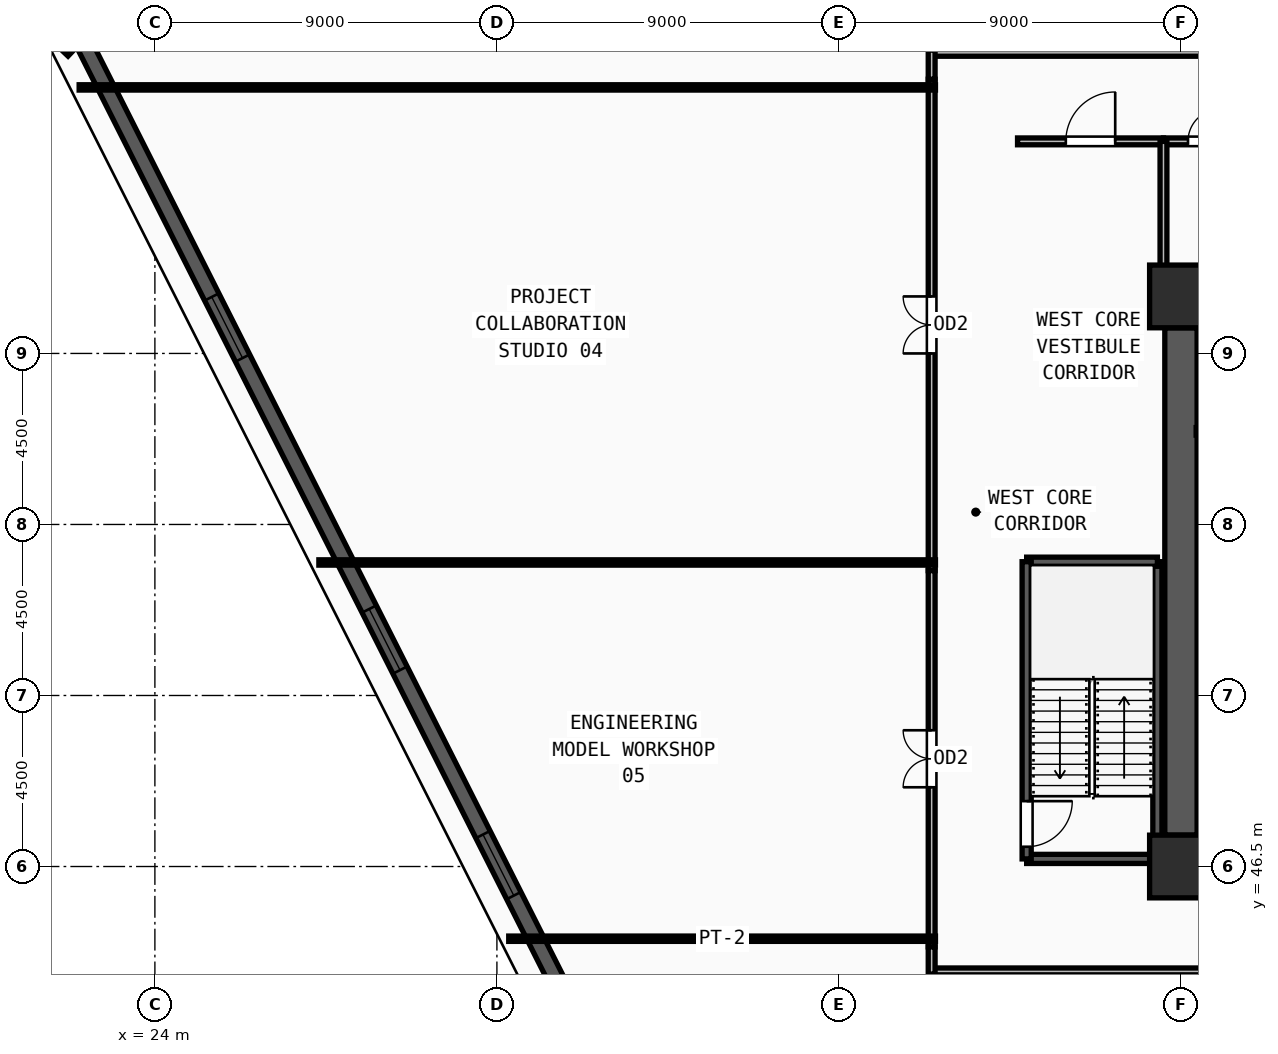
"""IFC4 building model, lengths in metres.
Left out: names, types, materials, properties, quantities, classifications, styles, units other than length and angle.
Written with IfcOpenShell. Run it as: python <this file> out.ifc"""

import sys

from ifc_helpers import new_model, si_unit, direction, frame, frame_2d, origin, origin_2d, place, context, subcontext, project, spatial, rectangle, extrude, source, transform, mapped, element, fill, save


model = new_model("IFC4")
c1 = context("Model", 3, precision=1e-05, world=origin(), true_north=direction((0.0, 1.0)))
c2 = subcontext(c1, "Body", "Model", "MODEL_VIEW")
j1 = project(units=[si_unit("LENGTHUNIT", "METRE"), si_unit("PLANEANGLEUNIT", "RADIAN")], contexts=[c1])
p1 = place(None, origin())
s1 = spatial("IfcSite", under=j1, at=p1, CompositionType="ELEMENT")
p2 = place(p1, origin())
s2 = spatial("IfcBuilding", under=s1, at=p2, CompositionType="ELEMENT")
p3 = place(p2, frame((0.0, 0.0, 63.0)))
s3 = spatial("IfcBuildingStorey", under=s2, at=p3, CompositionType="ELEMENT", Elevation=63.0)
m1 = source(origin(), c2, "Body", "SweptSolid", [
    extrude(rectangle(XDim=1.65, YDim=1.65, at=origin_2d()), origin(), (0.0, 0.0, 1.0), 3.75),
])
for number, where, z_axis, x_axis in (
    (1, (51.0, 46.5, 0.0), (0.0, 0.0, 1.0), (1.0, 0.0, 0.0)),
    (2, (51.0, 61.5, 0.0), (0.0, 0.0, 1.0), (1.0, 0.0, 0.0)),
):
    element("IfcColumn", number, at=place(p3, frame(where, z_axis=z_axis, x_axis=x_axis)), inside=s3, PredefinedType="COLUMN", context=c2, shape_type="MappedRepresentation", body=[
        mapped(m1, transform((0.0, 0.0, 0.0), x_axis=(1.0, 0.0, 0.0), y_axis=(0.0, 1.0, 0.0), z_axis=(0.0, 0.0, 1.0), scale=1.0)),
    ])
m2 = source(origin(), c2, "Body", "SweptSolid", [
    extrude(rectangle(XDim=1.55, YDim=1.25, at=origin_2d()), origin(), (0.0, 0.0, 1.0), 3.75),
])
p4 = place(p3, frame((21.796, 68.816, 0.0), z_axis=(0.0, 0.0, 1.0), x_axis=(0.689240273721, 0.724532846102, 0.0)))
e3 = element("IfcColumn", 3, at=p4, inside=s3, PredefinedType="COLUMN", context=c2, shape_type="MappedRepresentation", body=[
    mapped(m2, transform((0.0, 0.0, 0.0), x_axis=(1.0, 0.0, 0.0), y_axis=(0.0, 1.0, 0.0), z_axis=(0.0, 0.0, 1.0), scale=1.0)),
])
p5 = place(p3, frame((22.141, 68.133, 0.0), z_axis=(0.0, 0.0, 1.0), x_axis=(0.450521782218, -0.892765436017, 0.0)))
e4 = element("IfcWall", 4, at=p5, inside=s3, PredefinedType="SOLIDWALL", context=c2, shape_type="SweptSolid", body=[
    extrude(rectangle(XDim=33.385, YDim=0.42, at=frame_2d((16.693, 0.0))), origin(), (0.0, 0.0, 1.0), 3.57),
])
m3 = source(origin(), c2, "Body", "SweptSolid", [
    extrude(rectangle(XDim=1.8, YDim=1.95, at=frame_2d((0.9, 0.975))), frame((0.0, 0.22, 0.0), z_axis=(0.0, -1.0, 0.0), x_axis=(1.0, 0.0, 0.0)), (0.0, 0.0, 1.0), 0.44),
])
p6 = place(p5, frame((7.446, 0.0, 0.55)))
e5 = element("IfcOpeningElement", 5, at=p6, cuts=e4, PredefinedType="OPENING", context=c2, shape_type="MappedRepresentation", body=[
    mapped(m3, transform((0.0, 0.0, 0.0), x_axis=(1.0, 0.0, 0.0), y_axis=(0.0, 1.0, 0.0), z_axis=(0.0, 0.0, 1.0), scale=1.0)),
])
p7 = place(p5, frame((16.643, 0.0, 0.55)))
e6 = element("IfcOpeningElement", 6, at=p7, cuts=e4, PredefinedType="OPENING", context=c2, shape_type="MappedRepresentation", body=[
    mapped(m3, transform((0.0, 0.0, 0.0), x_axis=(1.0, 0.0, 0.0), y_axis=(0.0, 1.0, 0.0), z_axis=(0.0, 0.0, 1.0), scale=1.0)),
])
p8 = place(p5, frame((23.289, 0.0, 0.55)))
e7 = element("IfcOpeningElement", 7, at=p8, cuts=e4, PredefinedType="OPENING", context=c2, shape_type="MappedRepresentation", body=[
    mapped(m3, transform((0.0, 0.0, 0.0), x_axis=(1.0, 0.0, 0.0), y_axis=(0.0, 1.0, 0.0), z_axis=(0.0, 0.0, 1.0), scale=1.0)),
])
p9 = place(p3, frame((51.0, 47.325, 0.0), z_axis=(0.0, 0.0, 1.0), x_axis=(0.0, 1.0, 0.0)))
e8 = element("IfcWall", 8, at=p9, inside=s3, PredefinedType="SHEAR", context=c2, shape_type="SweptSolid", body=[
    extrude(rectangle(XDim=13.35, YDim=0.85, at=frame_2d((6.675, 0.0))), origin(), (0.0, 0.0, 1.0), 3.57),
])
p10 = place(p3, frame((46.94, 46.7, 0.0), z_axis=(0.0, 0.0, 1.0), x_axis=(1.0, 0.0, 0.0)))
e9 = element("IfcWall", 9, at=p10, inside=s3, PredefinedType="SOLIDWALL", context=c2, shape_type="SweptSolid", body=[
    extrude(rectangle(XDim=3.44, YDim=0.24, at=frame_2d((1.72, 0.0))), origin(), (0.0, 0.0, 1.0), 3.57),
])
p11 = place(p3, frame((50.38, 46.7, 0.0), z_axis=(0.0, 0.0, 1.0), x_axis=(0.0, 1.0, 0.0)))
e10 = element("IfcWall", 10, at=p11, inside=s3, PredefinedType="SOLIDWALL", context=c2, shape_type="SweptSolid", body=[
    extrude(rectangle(XDim=7.82, YDim=0.24, at=frame_2d((3.91, 0.0))), origin(), (0.0, 0.0, 1.0), 3.57),
])
p12 = place(p3, frame((50.38, 54.52, 0.0), z_axis=(0.0, 0.0, 1.0), x_axis=(-1.0, 0.0, 0.0)))
e11 = element("IfcWall", 11, at=p12, inside=s3, PredefinedType="SOLIDWALL", context=c2, shape_type="SweptSolid", body=[
    extrude(rectangle(XDim=3.44, YDim=0.24, at=frame_2d((1.72, 0.0))), origin(), (0.0, 0.0, 1.0), 3.57),
])
p13 = place(p3, frame((46.94, 54.52, 0.0), z_axis=(0.0, 0.0, 1.0), x_axis=(0.0, -1.0, 0.0)))
e12 = element("IfcWall", 12, at=p13, inside=s3, PredefinedType="SOLIDWALL", context=c2, shape_type="SweptSolid", body=[
    extrude(rectangle(XDim=7.82, YDim=0.24, at=frame_2d((3.91, 0.0))), origin(), (0.0, 0.0, 1.0), 3.57),
])
m4 = source(origin(), c2, "Body", "SweptSolid", [
    extrude(rectangle(XDim=1.2, YDim=2.2, at=frame_2d((0.6, 1.1))), frame((0.0, 0.13, 0.0), z_axis=(0.0, -1.0, 0.0), x_axis=(1.0, 0.0, 0.0)), (0.0, 0.0, 1.0), 0.26),
])
p14 = place(p13, frame((6.3, 0.0, 0.0)))
e13 = element("IfcOpeningElement", 13, at=p14, cuts=e12, PredefinedType="OPENING", context=c2, shape_type="MappedRepresentation", body=[
    mapped(m4, transform((0.0, 0.0, 0.0), x_axis=(1.0, 0.0, 0.0), y_axis=(0.0, 1.0, 0.0), z_axis=(0.0, 0.0, 1.0), scale=1.0)),
])
for number, where, z_axis, x_axis in (
    (14, (51.4, 57.95, 0.0), (0.0, 0.0, 1.0), (1.0, 0.0, 0.0)),
    (15, (53.8, 60.88, 0.0), (0.0, 0.0, 1.0), (-1.0, 0.0, 0.0)),
):
    element("IfcWall", number, at=place(p3, frame(where, z_axis=z_axis, x_axis=x_axis)), inside=s3, PredefinedType="SOLIDWALL", context=c2, shape_type="SweptSolid", body=[
        extrude(rectangle(XDim=2.4, YDim=0.2, at=frame_2d((1.2, 0.0))), origin(), (0.0, 0.0, 1.0), 3.57),
    ])
p15 = place(p3, frame((50.54, 65.58, 0.0), z_axis=(0.0, 0.0, 1.0), x_axis=(1.0, 0.0, 0.0)))
e16 = element("IfcWall", 16, at=p15, inside=s3, PredefinedType="PARTITIONING", context=c2, shape_type="SweptSolid", body=[
    extrude(rectangle(XDim=2.14, YDim=0.18, at=frame_2d((1.07, 0.0))), origin(), (0.0, 0.0, 1.0), 3.57),
])
m5 = source(origin(), c2, "Body", "SweptSolid", [
    extrude(rectangle(XDim=0.85, YDim=2.1, at=frame_2d((0.425, 1.05))), frame((0.0, 0.1, 0.0), z_axis=(0.0, -1.0, 0.0), x_axis=(1.0, 0.0, 0.0)), (0.0, 0.0, 1.0), 0.2),
])
p16 = place(p15, frame((0.645, 0.0, 0.0)))
e17 = element("IfcOpeningElement", 17, at=p16, cuts=e16, PredefinedType="OPENING", context=c2, shape_type="MappedRepresentation", body=[
    mapped(m5, transform((0.0, 0.0, 0.0), x_axis=(1.0, 0.0, 0.0), y_axis=(0.0, 1.0, 0.0), z_axis=(0.0, 0.0, 1.0), scale=1.0)),
])
p17 = place(p3, frame((46.7, 65.58, 0.0), z_axis=(0.0, 0.0, 1.0), x_axis=(1.0, 0.0, 0.0)))
e18 = element("IfcWall", 18, at=p17, inside=s3, PredefinedType="PARTITIONING", context=c2, shape_type="SweptSolid", body=[
    extrude(rectangle(XDim=3.84, YDim=0.18, at=frame_2d((1.92, 0.0))), origin(), (0.0, 0.0, 1.0), 3.57),
])
m6 = source(origin(), c2, "Body", "SweptSolid", [
    extrude(rectangle(XDim=1.3, YDim=2.2, at=frame_2d((0.65, 1.1))), frame((0.0, 0.1, 0.0), z_axis=(0.0, -1.0, 0.0), x_axis=(1.0, 0.0, 0.0)), (0.0, 0.0, 1.0), 0.2),
])
p18 = place(p17, frame((1.27, 0.0, 0.0)))
e19 = element("IfcOpeningElement", 19, at=p18, cuts=e18, PredefinedType="OPENING", context=c2, shape_type="MappedRepresentation", body=[
    mapped(m6, transform((0.0, 0.0, 0.0), x_axis=(1.0, 0.0, 0.0), y_axis=(0.0, 1.0, 0.0), z_axis=(0.0, 0.0, 1.0), scale=1.0)),
])
p19 = place(p3, frame((44.37, 67.91, 0.0), z_axis=(0.0, 0.0, 1.0), x_axis=(1.0, 0.0, 0.0)))
e20 = element("IfcWall", 20, at=p19, inside=s3, PredefinedType="PARTITIONING", context=c2, shape_type="SweptSolid", body=[
    extrude(rectangle(XDim=19.415, YDim=0.18, at=frame_2d((9.708, 0.0))), origin(), (0.0, 0.0, 1.0), 3.57),
])
m7 = source(origin(), c2, "Body", "SweptSolid", [
    extrude(rectangle(XDim=1.5, YDim=2.2, at=frame_2d((0.75, 1.1))), frame((0.0, 0.1, 0.0), z_axis=(0.0, -1.0, 0.0), x_axis=(1.0, 0.0, 0.0)), (0.0, 0.0, 1.0), 0.2),
])
p20 = place(p19, frame((8.957, 0.0, 0.0)))
e21 = element("IfcOpeningElement", 21, at=p20, cuts=e20, PredefinedType="OPENING", context=c2, shape_type="MappedRepresentation", body=[
    mapped(m7, transform((0.0, 0.0, 0.0), x_axis=(1.0, 0.0, 0.0), y_axis=(0.0, 1.0, 0.0), z_axis=(0.0, 0.0, 1.0), scale=1.0)),
])
p21 = place(p3, frame((44.44, 54.285, 0.0), z_axis=(0.0, 0.0, 1.0), x_axis=(0.0, 1.0, 0.0)))
e22 = element("IfcWall", 22, at=p21, inside=s3, PredefinedType="PARTITIONING", context=c2, shape_type="SweptSolid", body=[
    extrude(rectangle(XDim=12.93, YDim=0.18, at=frame_2d((6.465, 0.0))), origin(), (0.0, 0.0, 1.0), 3.57),
])
p22 = place(p21, frame((5.715, 0.0, 0.0)))
e23 = element("IfcOpeningElement", 23, at=p22, cuts=e22, PredefinedType="OPENING", context=c2, shape_type="MappedRepresentation", body=[
    mapped(m7, transform((0.0, 0.0, 0.0), x_axis=(1.0, 0.0, 0.0), y_axis=(0.0, 1.0, 0.0), z_axis=(0.0, 0.0, 1.0), scale=1.0)),
])
p23 = place(p3, frame((44.44, 44.385, 0.0), z_axis=(0.0, 0.0, 1.0), x_axis=(0.0, 1.0, 0.0)))
e24 = element("IfcWall", 24, at=p23, inside=s3, PredefinedType="PARTITIONING", context=c2, shape_type="SweptSolid", body=[
    extrude(rectangle(XDim=9.9, YDim=0.18, at=frame_2d((4.95, 0.0))), origin(), (0.0, 0.0, 1.0), 3.57),
])
p24 = place(p23, frame((4.2, 0.0, 0.0)))
e25 = element("IfcOpeningElement", 25, at=p24, cuts=e24, PredefinedType="OPENING", context=c2, shape_type="MappedRepresentation", body=[
    mapped(m7, transform((0.0, 0.0, 0.0), x_axis=(1.0, 0.0, 0.0), y_axis=(0.0, 1.0, 0.0), z_axis=(0.0, 0.0, 1.0), scale=1.0)),
])
p25 = place(p3, frame((75.63, 43.74, 0.0), z_axis=(0.0, 0.0, 1.0), x_axis=(-1.0, 0.0, 0.0)))
e26 = element("IfcWall", 26, at=p25, inside=s3, PredefinedType="PARTITIONING", context=c2, shape_type="SweptSolid", body=[
    extrude(rectangle(XDim=31.26, YDim=0.18, at=frame_2d((15.63, 0.0))), origin(), (0.0, 0.0, 1.0), 3.57),
])
p26 = place(p25, frame((9.78, 0.0, 0.0)))
e27 = element("IfcOpeningElement", 27, at=p26, cuts=e26, PredefinedType="OPENING", context=c2, shape_type="MappedRepresentation", body=[
    mapped(m7, transform((0.0, 0.0, 0.0), x_axis=(1.0, 0.0, 0.0), y_axis=(0.0, 1.0, 0.0), z_axis=(0.0, 0.0, 1.0), scale=1.0)),
])
p27 = place(p3, frame((50.54, 61.95, 0.0), z_axis=(0.0, 0.0, 1.0), x_axis=(0.0, 1.0, 0.0)))
e28 = element("IfcWall", 28, at=p27, inside=s3, PredefinedType="PARTITIONING", context=c2, shape_type="SweptSolid", body=[
    extrude(rectangle(XDim=3.63, YDim=0.18, at=frame_2d((1.815, 0.0))), origin(), (0.0, 0.0, 1.0), 3.57),
])
p28 = place(p3, frame((44.44, 67.215, 0.0), z_axis=(0.0, 0.0, 1.0), x_axis=(0.0, 1.0, 0.0)))
e29 = element("IfcWall", 29, at=p28, inside=s3, PredefinedType="PARTITIONING", context=c2, shape_type="SweptSolid", body=[
    extrude(rectangle(XDim=0.765, YDim=0.18, at=frame_2d((0.382, 0.0))), origin(), (0.0, 0.0, 1.0), 3.57),
])
p29 = place(p3, frame((44.44, 43.67, 0.0), z_axis=(0.0, 0.0, 1.0), x_axis=(0.0, 1.0, 0.0)))
e30 = element("IfcWall", 30, at=p29, inside=s3, PredefinedType="PARTITIONING", context=c2, shape_type="SweptSolid", body=[
    extrude(rectangle(XDim=0.715, YDim=0.18, at=frame_2d((0.357, 0.0))), origin(), (0.0, 0.0, 1.0), 3.57),
])
p30 = place(p3, frame((44.54, 44.6, 0.0), z_axis=(0.0, 0.0, 1.0), x_axis=(-1.0, 0.0, 0.0)))
e31 = element("IfcWall", 31, at=p30, inside=s3, PredefinedType="PARTITIONING", context=c2, shape_type="SweptSolid", body=[
    extrude(rectangle(XDim=11.229, YDim=0.14, at=frame_2d((5.615, 0.0))), origin(), (0.0, 0.0, 1.0), 3.57),
])
p31 = place(p3, frame((44.54, 54.5, 0.0), z_axis=(0.0, 0.0, 1.0), x_axis=(-1.0, 0.0, 0.0)))
e32 = element("IfcWall", 32, at=p31, inside=s3, PredefinedType="PARTITIONING", context=c2, shape_type="SweptSolid", body=[
    extrude(rectangle(XDim=16.225, YDim=0.14, at=frame_2d((8.113, 0.0))), origin(), (0.0, 0.0, 1.0), 3.57),
])
p32 = place(p3, frame((44.54, 67.0, 0.0), z_axis=(0.0, 0.0, 1.0), x_axis=(-1.0, 0.0, 0.0)))
e33 = element("IfcWall", 33, at=p32, inside=s3, PredefinedType="PARTITIONING", context=c2, shape_type="SweptSolid", body=[
    extrude(rectangle(XDim=22.533, YDim=0.14, at=frame_2d((11.267, 0.0))), origin(), (0.0, 0.0, 1.0), 2.655),
])
m8 = source(origin(), c2, "Body", "SweptSolid", [
    extrude(rectangle(XDim=1.8, YDim=1.95, at=frame_2d((0.9, 0.975))), frame((0.0, 0.03, 0.0), z_axis=(0.0, -1.0, 0.0), x_axis=(1.0, 0.0, 0.0)), (0.0, 0.0, 1.0), 0.06),
])
p33 = place(p6, origin())
e34 = element("IfcWindow", 34, at=p33, inside=s3, PartitioningType="DOUBLE_PANEL_VERTICAL", PredefinedType="WINDOW", context=c2, shape_type="MappedRepresentation", body=[
    mapped(m8, transform((0.0, 0.0, 0.0), x_axis=(1.0, 0.0, 0.0), y_axis=(0.0, 1.0, 0.0), z_axis=(0.0, 0.0, 1.0), scale=1.0)),
])
fill(e5, e34)
p34 = place(p7, origin())
e35 = element("IfcWindow", 35, at=p34, inside=s3, PartitioningType="DOUBLE_PANEL_VERTICAL", PredefinedType="WINDOW", context=c2, shape_type="MappedRepresentation", body=[
    mapped(m8, transform((0.0, 0.0, 0.0), x_axis=(1.0, 0.0, 0.0), y_axis=(0.0, 1.0, 0.0), z_axis=(0.0, 0.0, 1.0), scale=1.0)),
])
fill(e6, e35)
p35 = place(p8, origin())
e36 = element("IfcWindow", 36, at=p35, inside=s3, PartitioningType="DOUBLE_PANEL_VERTICAL", PredefinedType="WINDOW", context=c2, shape_type="MappedRepresentation", body=[
    mapped(m8, transform((0.0, 0.0, 0.0), x_axis=(1.0, 0.0, 0.0), y_axis=(0.0, 1.0, 0.0), z_axis=(0.0, 0.0, 1.0), scale=1.0)),
])
fill(e7, e36)
m9 = source(origin(), c2, "Body", "SweptSolid", [
    extrude(rectangle(XDim=1.2, YDim=2.2, at=frame_2d((0.6, 1.1))), frame((0.0, 0.025, 0.0), z_axis=(0.0, -1.0, 0.0), x_axis=(1.0, 0.0, 0.0)), (0.0, 0.0, 1.0), 0.05),
])
p36 = place(p14, origin())
e37 = element("IfcDoor", 37, at=p36, inside=s3, OperationType="SINGLE_SWING_LEFT", PredefinedType="DOOR", context=c2, shape_type="MappedRepresentation", body=[
    mapped(m9, transform((0.0, 0.0, 0.0), x_axis=(1.0, 0.0, 0.0), y_axis=(0.0, 1.0, 0.0), z_axis=(0.0, 0.0, 1.0), scale=1.0)),
])
fill(e13, e37)
m10 = source(origin(), c2, "Body", "SweptSolid", [
    extrude(rectangle(XDim=0.85, YDim=2.1, at=frame_2d((0.425, 1.05))), frame((0.0, 0.025, 0.0), z_axis=(0.0, -1.0, 0.0), x_axis=(1.0, 0.0, 0.0)), (0.0, 0.0, 1.0), 0.05),
])
p37 = place(p16, origin())
e38 = element("IfcDoor", 38, at=p37, inside=s3, OperationType="SINGLE_SWING_RIGHT", PredefinedType="DOOR", context=c2, shape_type="MappedRepresentation", body=[
    mapped(m10, transform((0.0, 0.0, 0.0), x_axis=(1.0, 0.0, 0.0), y_axis=(0.0, 1.0, 0.0), z_axis=(0.0, 0.0, 1.0), scale=1.0)),
])
fill(e17, e38)
m11 = source(origin(), c2, "Body", "SweptSolid", [
    extrude(rectangle(XDim=1.3, YDim=2.2, at=frame_2d((0.65, 1.1))), frame((0.0, 0.025, 0.0), z_axis=(0.0, -1.0, 0.0), x_axis=(1.0, 0.0, 0.0)), (0.0, 0.0, 1.0), 0.05),
])
p38 = place(p18, origin())
e39 = element("IfcDoor", 39, at=p38, inside=s3, OperationType="SINGLE_SWING_RIGHT", PredefinedType="DOOR", context=c2, shape_type="MappedRepresentation", body=[
    mapped(m11, transform((0.0, 0.0, 0.0), x_axis=(1.0, 0.0, 0.0), y_axis=(0.0, 1.0, 0.0), z_axis=(0.0, 0.0, 1.0), scale=1.0)),
])
fill(e19, e39)
m12 = source(origin(), c2, "Body", "SweptSolid", [
    extrude(rectangle(XDim=1.5, YDim=2.2, at=frame_2d((0.75, 1.1))), frame((0.0, 0.025, 0.0), z_axis=(0.0, -1.0, 0.0), x_axis=(1.0, 0.0, 0.0)), (0.0, 0.0, 1.0), 0.05),
])
p39 = place(p22, origin())
e40 = element("IfcDoor", 40, at=p39, inside=s3, OperationType="DOUBLE_DOOR_SINGLE_SWING", PredefinedType="DOOR", context=c2, shape_type="MappedRepresentation", body=[
    mapped(m12, transform((0.0, 0.0, 0.0), x_axis=(1.0, 0.0, 0.0), y_axis=(0.0, 1.0, 0.0), z_axis=(0.0, 0.0, 1.0), scale=1.0)),
])
fill(e23, e40)
p40 = place(p24, origin())
e41 = element("IfcDoor", 41, at=p40, inside=s3, OperationType="DOUBLE_DOOR_SINGLE_SWING", PredefinedType="DOOR", context=c2, shape_type="MappedRepresentation", body=[
    mapped(m12, transform((0.0, 0.0, 0.0), x_axis=(1.0, 0.0, 0.0), y_axis=(0.0, 1.0, 0.0), z_axis=(0.0, 0.0, 1.0), scale=1.0)),
])
fill(e25, e41)
save(model, sys.argv[1])
